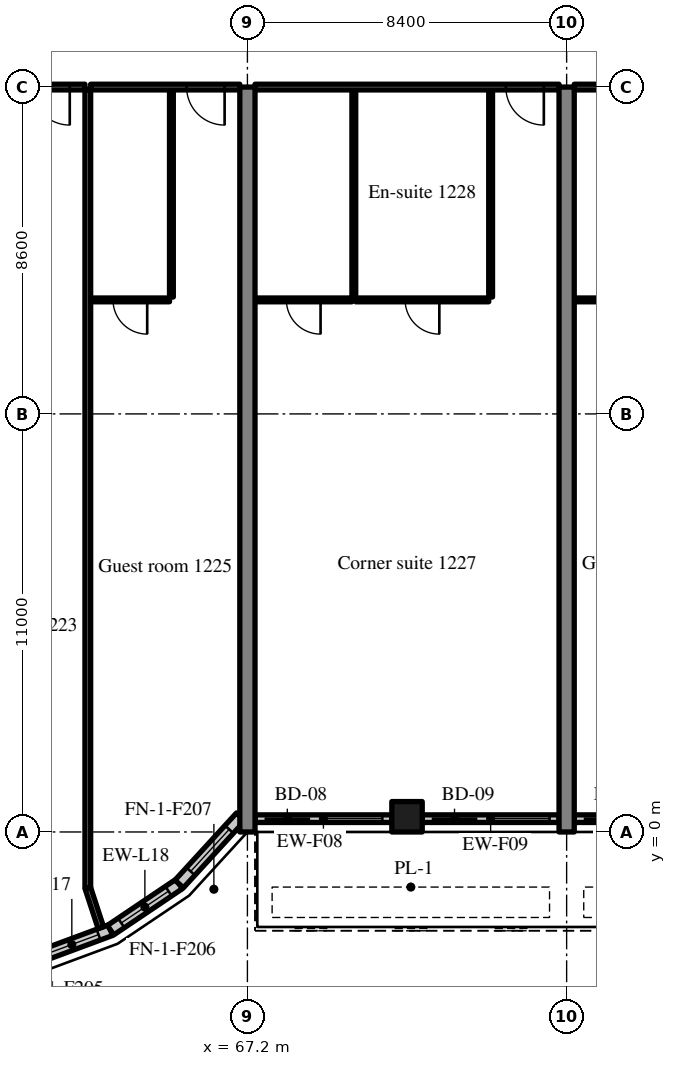
"""IFC4 building model, lengths in metres.
Left out: names, types, materials, properties, quantities, classifications, styles, units other than length and angle.
Written with IfcOpenShell. Run it as: python <this file> out.ifc"""

import sys

from ifc_helpers import new_model, si_unit, direction, frame, frame_2d, origin, origin_2d, place, context, subcontext, project, spatial, rectangle, extrude, source, transform, mapped, element, fill, save


model = new_model("IFC4")
c1 = context("Model", 3, precision=1e-05, world=origin(), true_north=direction((0.0, 1.0)))
c2 = subcontext(c1, "Body", "Model", "MODEL_VIEW")
j1 = project(units=[si_unit("LENGTHUNIT", "METRE"), si_unit("PLANEANGLEUNIT", "RADIAN")], contexts=[c1])
p1 = place(None, origin())
s1 = spatial("IfcSite", under=j1, at=p1, CompositionType="ELEMENT")
p2 = place(p1, origin())
s2 = spatial("IfcBuilding", under=s1, at=p2, CompositionType="ELEMENT")
p3 = place(p2, frame((0.0, 0.0, 54.4)))
s3 = spatial("IfcBuildingStorey", under=s2, at=p3, CompositionType="ELEMENT", Elevation=54.4)
m1 = source(origin(), c2, "Body", "SweptSolid", [
    extrude(rectangle(XDim=19.6, YDim=0.4, at=frame_2d((9.8, 0.0))), origin(), (0.0, 0.0, 1.0), 3.52),
])
for number, where, z_axis, x_axis in (
    (1, (67.2, 0.0, 0.0), (0.0, 0.0, 1.0), (0.0, 1.0, 0.0)),
    (2, (75.6, 0.0, 0.0), (0.0, 0.0, 1.0), (0.0, 1.0, 0.0)),
):
    element("IfcWall", number, at=place(p3, frame(where, z_axis=z_axis, x_axis=x_axis)), inside=s3, PredefinedType="SHEAR", context=c2, shape_type="MappedRepresentation", body=[
        mapped(m1, transform((0.0, 0.0, 0.0), scale=1.0)),
    ])
m2 = source(origin(), c2, "Body", "SweptSolid", [
    extrude(rectangle(XDim=0.8, YDim=0.8, at=origin_2d()), origin(), (0.0, 0.0, 1.0), 3.52),
])
p4 = place(p3, frame((71.4, 0.4, 0.0), z_axis=(0.0, 0.0, 1.0), x_axis=(1.0, 0.0, 0.0)))
e3 = element("IfcColumn", 3, at=p4, inside=s3, PredefinedType="COLUMN", context=c2, shape_type="MappedRepresentation", body=[
    mapped(m2, transform((0.0, 0.0, 0.0), scale=1.0)),
])
m3 = source(origin(), c2, "Body", "SweptSolid", [
    extrude(rectangle(XDim=2.176, YDim=0.3, at=frame_2d((1.088, 0.0))), origin(), (0.0, 0.0, 1.0), 3.52),
])
p5 = place(p3, frame((61.56, -3.34, 0.0), z_axis=(0.0, 0.0, 1.0), x_axis=(0.937531979054, 0.347899106424, 0.0)))
e4 = element("IfcWall", 4, at=p5, inside=s3, PredefinedType="SOLIDWALL", context=c2, shape_type="MappedRepresentation", body=[
    mapped(m3, transform((0.0, 0.0, 0.0), scale=1.0)),
])
m4 = source(origin(), c2, "Body", "SweptSolid", [
    extrude(rectangle(XDim=1.5, YDim=2.0, at=frame_2d((0.75, 1.0))), frame((0.0, 0.16, 0.0), z_axis=(0.0, -1.0, 0.0), x_axis=(1.0, 0.0, 0.0)), (0.0, 0.0, 1.0), 0.32),
])
p6 = place(p5, frame((0.338, 0.0, 0.9)))
e5 = element("IfcOpeningElement", 5, at=p6, cuts=e4, PredefinedType="OPENING", context=c2, shape_type="MappedRepresentation", body=[
    mapped(m4, transform((0.0, 0.0, 0.0), scale=1.0)),
])
m5 = source(origin(), c2, "Body", "SweptSolid", [
    extrude(rectangle(XDim=2.176, YDim=0.3, at=frame_2d((1.088, 0.0))), origin(), (0.0, 0.0, 1.0), 3.52),
])
p7 = place(p3, frame((63.599, -2.583, 0.0), z_axis=(0.0, 0.0, 1.0), x_axis=(0.829625727223, 0.558319937607, 0.0)))
e6 = element("IfcWall", 6, at=p7, inside=s3, PredefinedType="SOLIDWALL", context=c2, shape_type="MappedRepresentation", body=[
    mapped(m5, transform((0.0, 0.0, 0.0), scale=1.0)),
])
p8 = place(p7, frame((0.338, 0.0, 0.9)))
e7 = element("IfcOpeningElement", 7, at=p8, cuts=e6, PredefinedType="OPENING", context=c2, shape_type="MappedRepresentation", body=[
    mapped(m4, transform((0.0, 0.0, 0.0), scale=1.0)),
])
m6 = source(origin(), c2, "Body", "SweptSolid", [
    extrude(rectangle(XDim=2.398, YDim=0.3, at=frame_2d((1.199, 0.0))), origin(), (0.0, 0.0, 1.0), 3.52),
])
p9 = place(p3, frame((65.404, -1.369, 0.0), z_axis=(0.0, 0.0, 1.0), x_axis=(0.675374189419, 0.737475222815, 0.0)))
e8 = element("IfcWall", 8, at=p9, inside=s3, PredefinedType="SOLIDWALL", context=c2, shape_type="MappedRepresentation", body=[
    mapped(m6, transform((0.0, 0.0, 0.0), scale=1.0)),
])
p10 = place(p9, frame((0.449, 0.0, 0.9)))
e9 = element("IfcOpeningElement", 9, at=p10, cuts=e8, PredefinedType="OPENING", context=c2, shape_type="MappedRepresentation", body=[
    mapped(m4, transform((0.0, 0.0, 0.0), scale=1.0)),
])
m7 = source(origin(), c2, "Body", "SweptSolid", [
    extrude(rectangle(XDim=3.6, YDim=0.2, at=frame_2d((1.8, 0.0))), origin(), (0.0, 0.0, 1.0), 2.82),
])
p11 = place(p3, frame((67.4, 0.35, 0.0), z_axis=(0.0, 0.0, 1.0), x_axis=(1.0, 0.0, 0.0)))
e10 = element("IfcWall", 10, at=p11, inside=s3, PredefinedType="SOLIDWALL", context=c2, shape_type="MappedRepresentation", body=[
    mapped(m7, transform((0.0, 0.0, 0.0), scale=1.0)),
])
m8 = source(origin(), c2, "Body", "SweptSolid", [
    extrude(rectangle(XDim=1.2, YDim=2.4, at=frame_2d((0.6, 1.2))), frame((0.0, 0.11, 0.0), z_axis=(0.0, -1.0, 0.0), x_axis=(1.0, 0.0, 0.0)), (0.0, 0.0, 1.0), 0.22),
])
p12 = place(p11, frame((0.25, 0.0, 0.0)))
e11 = element("IfcOpeningElement", 11, at=p12, cuts=e10, PredefinedType="OPENING", context=c2, shape_type="MappedRepresentation", body=[
    mapped(m8, transform((0.0, 0.0, 0.0), scale=1.0)),
])
m9 = source(origin(), c2, "Body", "SweptSolid", [
    extrude(rectangle(XDim=1.5, YDim=1.5, at=frame_2d((0.75, 0.75))), frame((0.0, 0.11, 0.0), z_axis=(0.0, -1.0, 0.0), x_axis=(1.0, 0.0, 0.0)), (0.0, 0.0, 1.0), 0.22),
])
p13 = place(p11, frame((1.85, 0.0, 0.9)))
e12 = element("IfcOpeningElement", 12, at=p13, cuts=e10, PredefinedType="OPENING", context=c2, shape_type="MappedRepresentation", body=[
    mapped(m9, transform((0.0, 0.0, 0.0), scale=1.0)),
])
m10 = source(origin(), c2, "Body", "SweptSolid", [
    extrude(rectangle(XDim=3.6, YDim=0.2, at=frame_2d((1.8, 0.0))), origin(), (0.0, 0.0, 1.0), 2.82),
])
p14 = place(p3, frame((71.8, 0.35, 0.0), z_axis=(0.0, 0.0, 1.0), x_axis=(1.0, 0.0, 0.0)))
e13 = element("IfcWall", 13, at=p14, inside=s3, PredefinedType="SOLIDWALL", context=c2, shape_type="MappedRepresentation", body=[
    mapped(m10, transform((0.0, 0.0, 0.0), scale=1.0)),
])
p15 = place(p14, frame((0.25, 0.0, 0.0)))
e14 = element("IfcOpeningElement", 14, at=p15, cuts=e13, PredefinedType="OPENING", context=c2, shape_type="MappedRepresentation", body=[
    mapped(m8, transform((0.0, 0.0, 0.0), scale=1.0)),
])
p16 = place(p14, frame((1.85, 0.0, 0.9)))
e15 = element("IfcOpeningElement", 15, at=p16, cuts=e13, PredefinedType="OPENING", context=c2, shape_type="MappedRepresentation", body=[
    mapped(m9, transform((0.0, 0.0, 0.0), scale=1.0)),
])
p17 = place(p3, frame((75.8, 0.35, 0.0), z_axis=(0.0, 0.0, 1.0), x_axis=(1.0, 0.0, 0.0)))
e16 = element("IfcWall", 16, at=p17, inside=s3, PredefinedType="SOLIDWALL", context=c2, shape_type="MappedRepresentation", body=[
    mapped(m10, transform((0.0, 0.0, 0.0), scale=1.0)),
])
p18 = place(p17, frame((0.25, 0.0, 0.0)))
e17 = element("IfcOpeningElement", 17, at=p18, cuts=e16, PredefinedType="OPENING", context=c2, shape_type="MappedRepresentation", body=[
    mapped(m8, transform((0.0, 0.0, 0.0), scale=1.0)),
])
p19 = place(p17, frame((1.85, 0.0, 0.9)))
e18 = element("IfcOpeningElement", 18, at=p19, cuts=e16, PredefinedType="OPENING", context=c2, shape_type="MappedRepresentation", body=[
    mapped(m9, transform((0.0, 0.0, 0.0), scale=1.0)),
])
m11 = source(origin(), c2, "Body", "SweptSolid", [
    extrude(rectangle(XDim=3.925, YDim=0.15, at=frame_2d((1.962, 0.0))), origin(), (0.0, 0.0, 1.0), 2.82),
])
p20 = place(p3, frame((59.0, 19.6, 0.0), z_axis=(0.0, 0.0, 1.0), x_axis=(1.0, 0.0, 0.0)))
e19 = element("IfcWall", 19, at=p20, inside=s3, PredefinedType="PARTITIONING", context=c2, shape_type="MappedRepresentation", body=[
    mapped(m11, transform((0.0, 0.0, 0.0), scale=1.0)),
])
m12 = source(origin(), c2, "Body", "SweptSolid", [
    extrude(rectangle(XDim=1.0, YDim=2.1, at=frame_2d((0.5, 1.05))), frame((0.0, 0.085, 0.0), z_axis=(0.0, -1.0, 0.0), x_axis=(1.0, 0.0, 0.0)), (0.0, 0.0, 1.0), 0.17),
])
p21 = place(p20, frame((2.525, 0.0, 0.0)))
e20 = element("IfcOpeningElement", 20, at=p21, cuts=e19, PredefinedType="OPENING", context=c2, shape_type="MappedRepresentation", body=[
    mapped(m12, transform((0.0, 0.0, 0.0), scale=1.0)),
])
m13 = source(origin(), c2, "Body", "SweptSolid", [
    extrude(rectangle(XDim=5.45, YDim=0.1, at=frame_2d((2.725, 0.0))), origin(), (0.0, 0.0, 1.0), 3.52),
])
p22 = place(p3, frame((65.2, 14.075, 0.0), z_axis=(0.0, 0.0, 1.0), x_axis=(0.0, 1.0, 0.0)))
e21 = element("IfcWall", 21, at=p22, inside=s3, PredefinedType="PARTITIONING", context=c2, shape_type="MappedRepresentation", body=[
    mapped(m13, transform((0.0, 0.0, 0.0), scale=1.0)),
])
m14 = source(origin(), c2, "Body", "SweptSolid", [
    extrude(rectangle(XDim=2.075, YDim=0.1, at=frame_2d((1.038, 0.0))), origin(), (0.0, 0.0, 1.0), 3.52),
])
p23 = place(p3, frame((63.075, 14.0, 0.0), z_axis=(0.0, 0.0, 1.0), x_axis=(1.0, 0.0, 0.0)))
e22 = element("IfcWall", 22, at=p23, inside=s3, PredefinedType="PARTITIONING", context=c2, shape_type="MappedRepresentation", body=[
    mapped(m14, transform((0.0, 0.0, 0.0), scale=1.0)),
])
m15 = source(origin(), c2, "Body", "SweptSolid", [
    extrude(rectangle(XDim=0.9, YDim=2.1, at=frame_2d((0.45, 1.05))), frame((0.0, 0.06, 0.0), z_axis=(0.0, -1.0, 0.0), x_axis=(1.0, 0.0, 0.0)), (0.0, 0.0, 1.0), 0.12),
])
p24 = place(p23, frame((0.588, 0.0, 0.0)))
e23 = element("IfcOpeningElement", 23, at=p24, cuts=e22, PredefinedType="OPENING", context=c2, shape_type="MappedRepresentation", body=[
    mapped(m15, transform((0.0, 0.0, 0.0), scale=1.0)),
])
p25 = place(p3, frame((63.075, 19.6, 0.0), z_axis=(0.0, 0.0, 1.0), x_axis=(1.0, 0.0, 0.0)))
e24 = element("IfcWall", 24, at=p25, inside=s3, PredefinedType="PARTITIONING", context=c2, shape_type="MappedRepresentation", body=[
    mapped(m11, transform((0.0, 0.0, 0.0), scale=1.0)),
])
p26 = place(p25, frame((2.525, 0.0, 0.0)))
e25 = element("IfcOpeningElement", 25, at=p26, cuts=e24, PredefinedType="OPENING", context=c2, shape_type="MappedRepresentation", body=[
    mapped(m12, transform((0.0, 0.0, 0.0), scale=1.0)),
])
m16 = source(origin(), c2, "Body", "SweptSolid", [
    extrude(rectangle(XDim=20.998, YDim=0.15, at=frame_2d((10.499, 0.0))), origin(), (0.0, 0.0, 1.0), 3.52),
])
p27 = place(p3, frame((63.0, -1.473, 0.0), z_axis=(0.0, 0.0, 1.0), x_axis=(0.0, 1.0, 0.0)))
e26 = element("IfcWall", 26, at=p27, inside=s3, PredefinedType="PARTITIONING", context=c2, shape_type="MappedRepresentation", body=[
    mapped(m16, transform((0.0, 0.0, 0.0), scale=1.0)),
])
for number, where, z_axis, x_axis in (
    (27, (73.6, 14.075, 0.0), (0.0, 0.0, 1.0), (0.0, 1.0, 0.0)),
    (28, (70.0, 14.075, 0.0), (0.0, 0.0, 1.0), (0.0, 1.0, 0.0)),
):
    element("IfcWall", number, at=place(p3, frame(where, z_axis=z_axis, x_axis=x_axis)), inside=s3, PredefinedType="PARTITIONING", context=c2, shape_type="MappedRepresentation", body=[
        mapped(m13, transform((0.0, 0.0, 0.0), scale=1.0)),
    ])
m17 = source(origin(), c2, "Body", "SweptSolid", [
    extrude(rectangle(XDim=3.5, YDim=0.1, at=frame_2d((1.75, 0.0))), origin(), (0.0, 0.0, 1.0), 3.52),
])
p28 = place(p3, frame((70.05, 14.0, 0.0), z_axis=(0.0, 0.0, 1.0), x_axis=(1.0, 0.0, 0.0)))
e29 = element("IfcWall", 29, at=p28, inside=s3, PredefinedType="PARTITIONING", context=c2, shape_type="MappedRepresentation", body=[
    mapped(m17, transform((0.0, 0.0, 0.0), scale=1.0)),
])
p29 = place(p28, frame((1.3, 0.0, 0.0)))
e30 = element("IfcOpeningElement", 30, at=p29, cuts=e29, PredefinedType="OPENING", context=c2, shape_type="MappedRepresentation", body=[
    mapped(m15, transform((0.0, 0.0, 0.0), scale=1.0)),
])
m18 = source(origin(), c2, "Body", "SweptSolid", [
    extrude(rectangle(XDim=2.55, YDim=0.1, at=frame_2d((1.275, 0.0))), origin(), (0.0, 0.0, 1.0), 3.52),
])
p30 = place(p3, frame((67.4, 14.0, 0.0), z_axis=(0.0, 0.0, 1.0), x_axis=(1.0, 0.0, 0.0)))
e31 = element("IfcWall", 31, at=p30, inside=s3, PredefinedType="PARTITIONING", context=c2, shape_type="MappedRepresentation", body=[
    mapped(m18, transform((0.0, 0.0, 0.0), scale=1.0)),
])
p31 = place(p30, frame((0.825, 0.0, 0.0)))
e32 = element("IfcOpeningElement", 32, at=p31, cuts=e31, PredefinedType="OPENING", context=c2, shape_type="MappedRepresentation", body=[
    mapped(m15, transform((0.0, 0.0, 0.0), scale=1.0)),
])
m19 = source(origin(), c2, "Body", "SweptSolid", [
    extrude(rectangle(XDim=8.0, YDim=0.15, at=frame_2d((4.0, 0.0))), origin(), (0.0, 0.0, 1.0), 2.82),
])
p32 = place(p3, frame((67.4, 19.6, 0.0), z_axis=(0.0, 0.0, 1.0), x_axis=(1.0, 0.0, 0.0)))
e33 = element("IfcWall", 33, at=p32, inside=s3, PredefinedType="PARTITIONING", context=c2, shape_type="MappedRepresentation", body=[
    mapped(m19, transform((0.0, 0.0, 0.0), scale=1.0)),
])
p33 = place(p32, frame((6.6, 0.0, 0.0)))
e34 = element("IfcOpeningElement", 34, at=p33, cuts=e33, PredefinedType="OPENING", context=c2, shape_type="MappedRepresentation", body=[
    mapped(m12, transform((0.0, 0.0, 0.0), scale=1.0)),
])
p34 = place(p3, frame((75.8, 14.0, 0.0), z_axis=(0.0, 0.0, 1.0), x_axis=(1.0, 0.0, 0.0)))
e35 = element("IfcWall", 35, at=p34, inside=s3, PredefinedType="PARTITIONING", context=c2, shape_type="MappedRepresentation", body=[
    mapped(m14, transform((0.0, 0.0, 0.0), scale=1.0)),
])
p35 = place(p34, frame((0.588, 0.0, 0.0)))
e36 = element("IfcOpeningElement", 36, at=p35, cuts=e35, PredefinedType="OPENING", context=c2, shape_type="MappedRepresentation", body=[
    mapped(m15, transform((0.0, 0.0, 0.0), scale=1.0)),
])
p36 = place(p3, frame((75.8, 19.6, 0.0), z_axis=(0.0, 0.0, 1.0), x_axis=(1.0, 0.0, 0.0)))
e37 = element("IfcWall", 37, at=p36, inside=s3, PredefinedType="PARTITIONING", context=c2, shape_type="MappedRepresentation", body=[
    mapped(m11, transform((0.0, 0.0, 0.0), scale=1.0)),
])
p37 = place(p36, frame((2.525, 0.0, 0.0)))
e38 = element("IfcOpeningElement", 38, at=p37, cuts=e37, PredefinedType="OPENING", context=c2, shape_type="MappedRepresentation", body=[
    mapped(m12, transform((0.0, 0.0, 0.0), scale=1.0)),
])
m20 = source(origin(), c2, "Body", "SweptSolid", [
    extrude(rectangle(XDim=1.101, YDim=0.15, at=frame_2d((0.55, 0.0))), origin(), (0.0, 0.0, 1.0), 3.52),
])
p38 = place(p3, frame((63.343, -2.519, 0.0), z_axis=(0.0, 0.0, 1.0), x_axis=(-0.311567081539, 0.950224159712, 0.0)))
e39 = element("IfcWall", 39, at=p38, inside=s3, PredefinedType="PARTITIONING", context=c2, shape_type="MappedRepresentation", body=[
    mapped(m20, transform((0.0, 0.0, 0.0), scale=1.0)),
])
m21 = source(origin(), c2, "Body", "SweptSolid", [
    extrude(rectangle(XDim=1.5, YDim=2.0, at=frame_2d((0.75, 1.0))), frame((0.0, 0.03, 0.0), z_axis=(0.0, -1.0, 0.0), x_axis=(1.0, 0.0, 0.0)), (0.0, 0.0, 1.0), 0.06),
])
p39 = place(p6, origin())
e40 = element("IfcWindow", 40, at=p39, inside=s3, PartitioningType="SINGLE_PANEL", PredefinedType="WINDOW", context=c2, shape_type="MappedRepresentation", body=[
    mapped(m21, transform((0.0, 0.0, 0.0), scale=1.0)),
])
fill(e5, e40)
p40 = place(p8, origin())
e41 = element("IfcWindow", 41, at=p40, inside=s3, PartitioningType="SINGLE_PANEL", PredefinedType="WINDOW", context=c2, shape_type="MappedRepresentation", body=[
    mapped(m21, transform((0.0, 0.0, 0.0), scale=1.0)),
])
fill(e7, e41)
p41 = place(p10, origin())
e42 = element("IfcWindow", 42, at=p41, inside=s3, PartitioningType="SINGLE_PANEL", PredefinedType="WINDOW", context=c2, shape_type="MappedRepresentation", body=[
    mapped(m21, transform((0.0, 0.0, 0.0), scale=1.0)),
])
fill(e9, e42)
m22 = source(origin(), c2, "Body", "SweptSolid", [
    extrude(rectangle(XDim=1.2, YDim=2.4, at=frame_2d((0.6, 1.2))), frame((0.0, 0.025, 0.0), z_axis=(0.0, -1.0, 0.0), x_axis=(1.0, 0.0, 0.0)), (0.0, 0.0, 1.0), 0.05),
])
p42 = place(p12, origin())
e43 = element("IfcDoor", 43, at=p42, inside=s3, OperationType="SLIDING_TO_RIGHT", PredefinedType="DOOR", context=c2, shape_type="MappedRepresentation", body=[
    mapped(m22, transform((0.0, 0.0, 0.0), scale=1.0)),
])
fill(e11, e43)
m23 = source(origin(), c2, "Body", "SweptSolid", [
    extrude(rectangle(XDim=1.5, YDim=1.5, at=frame_2d((0.75, 0.75))), frame((0.0, 0.03, 0.0), z_axis=(0.0, -1.0, 0.0), x_axis=(1.0, 0.0, 0.0)), (0.0, 0.0, 1.0), 0.06),
])
p43 = place(p13, origin())
e44 = element("IfcWindow", 44, at=p43, inside=s3, PartitioningType="SINGLE_PANEL", PredefinedType="WINDOW", context=c2, shape_type="MappedRepresentation", body=[
    mapped(m23, transform((0.0, 0.0, 0.0), scale=1.0)),
])
fill(e12, e44)
p44 = place(p15, origin())
e45 = element("IfcDoor", 45, at=p44, inside=s3, OperationType="SLIDING_TO_LEFT", PredefinedType="DOOR", context=c2, shape_type="MappedRepresentation", body=[
    mapped(m22, transform((0.0, 0.0, 0.0), scale=1.0)),
])
fill(e14, e45)
p45 = place(p16, origin())
e46 = element("IfcWindow", 46, at=p45, inside=s3, PartitioningType="SINGLE_PANEL", PredefinedType="WINDOW", context=c2, shape_type="MappedRepresentation", body=[
    mapped(m23, transform((0.0, 0.0, 0.0), scale=1.0)),
])
fill(e15, e46)
p46 = place(p18, origin())
e47 = element("IfcDoor", 47, at=p46, inside=s3, OperationType="SLIDING_TO_RIGHT", PredefinedType="DOOR", context=c2, shape_type="MappedRepresentation", body=[
    mapped(m22, transform((0.0, 0.0, 0.0), scale=1.0)),
])
fill(e17, e47)
m24 = source(origin(), c2, "Body", "SweptSolid", [
    extrude(rectangle(XDim=1.0, YDim=2.1, at=frame_2d((0.5, 1.05))), frame((0.0, 0.025, 0.0), z_axis=(0.0, -1.0, 0.0), x_axis=(1.0, 0.0, 0.0)), (0.0, 0.0, 1.0), 0.05),
])
p47 = place(p21, origin())
e48 = element("IfcDoor", 48, at=p47, inside=s3, OperationType="SINGLE_SWING_RIGHT", PredefinedType="DOOR", context=c2, shape_type="MappedRepresentation", body=[
    mapped(m24, transform((0.0, 0.0, 0.0), scale=1.0)),
])
fill(e20, e48)
m25 = source(origin(), c2, "Body", "SweptSolid", [
    extrude(rectangle(XDim=0.9, YDim=2.1, at=frame_2d((0.45, 1.05))), frame((0.0, 0.025, 0.0), z_axis=(0.0, -1.0, 0.0), x_axis=(1.0, 0.0, 0.0)), (0.0, 0.0, 1.0), 0.05),
])
p48 = place(p24, origin())
e49 = element("IfcDoor", 49, at=p48, inside=s3, OperationType="SINGLE_SWING_RIGHT", PredefinedType="DOOR", context=c2, shape_type="MappedRepresentation", body=[
    mapped(m25, transform((0.0, 0.0, 0.0), scale=1.0)),
])
fill(e23, e49)
p49 = place(p26, origin())
e50 = element("IfcDoor", 50, at=p49, inside=s3, OperationType="SINGLE_SWING_RIGHT", PredefinedType="DOOR", context=c2, shape_type="MappedRepresentation", body=[
    mapped(m24, transform((0.0, 0.0, 0.0), scale=1.0)),
])
fill(e25, e50)
p50 = place(p29, origin())
e51 = element("IfcDoor", 51, at=p50, inside=s3, OperationType="SINGLE_SWING_RIGHT", PredefinedType="DOOR", context=c2, shape_type="MappedRepresentation", body=[
    mapped(m25, transform((0.0, 0.0, 0.0), scale=1.0)),
])
fill(e30, e51)
p51 = place(p31, origin())
e52 = element("IfcDoor", 52, at=p51, inside=s3, OperationType="SINGLE_SWING_RIGHT", PredefinedType="DOOR", context=c2, shape_type="MappedRepresentation", body=[
    mapped(m25, transform((0.0, 0.0, 0.0), scale=1.0)),
])
fill(e32, e52)
p52 = place(p33, origin())
e53 = element("IfcDoor", 53, at=p52, inside=s3, OperationType="SINGLE_SWING_RIGHT", PredefinedType="DOOR", context=c2, shape_type="MappedRepresentation", body=[
    mapped(m24, transform((0.0, 0.0, 0.0), scale=1.0)),
])
fill(e34, e53)
p53 = place(p35, origin())
e54 = element("IfcDoor", 54, at=p53, inside=s3, OperationType="SINGLE_SWING_RIGHT", PredefinedType="DOOR", context=c2, shape_type="MappedRepresentation", body=[
    mapped(m25, transform((0.0, 0.0, 0.0), scale=1.0)),
])
fill(e36, e54)
save(model, sys.argv[1])
